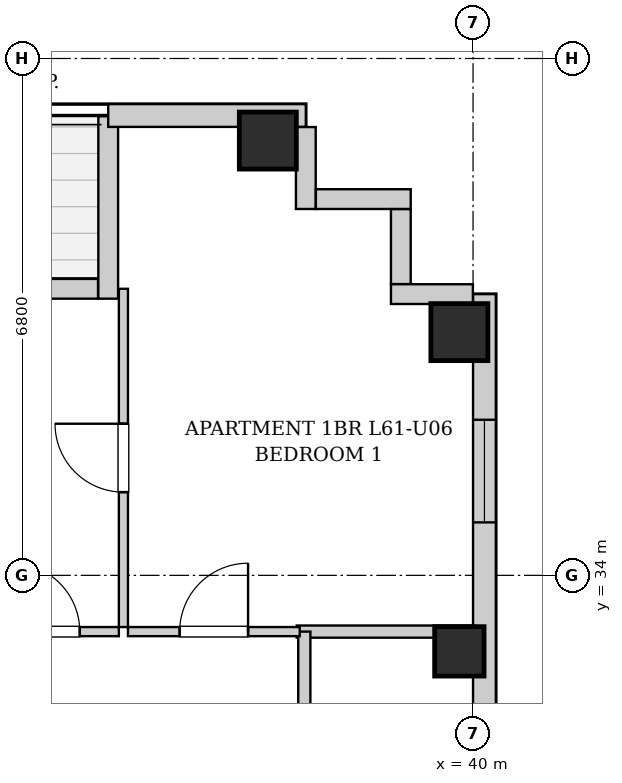
"""IFC4 building model, lengths in metres.
Left out: names, types, materials, properties, quantities, classifications, styles, units other than length and angle.
Written with IfcOpenShell. Run it as: python <this file> out.ifc"""

import sys

from ifc_helpers import new_model, si_unit, direction, frame, frame_2d, origin, origin_2d, place, context, subcontext, project, spatial, rectangle, extrude, element, fill, save


model = new_model("IFC4")
c1 = context("Model", 3, precision=1e-05, world=origin(), true_north=direction((0.0, 1.0)))
c2 = subcontext(c1, "Body", "Model", "MODEL_VIEW")
j1 = project(units=[si_unit("LENGTHUNIT", "METRE"), si_unit("PLANEANGLEUNIT", "RADIAN")], contexts=[c1])
p1 = place(None, origin())
s1 = spatial("IfcSite", under=j1, at=p1, CompositionType="ELEMENT")
p2 = place(p1, origin())
s2 = spatial("IfcBuilding", under=s1, at=p2, CompositionType="ELEMENT")
p3 = place(p2, frame((0.0, 0.0, 210.7)))
s3 = spatial("IfcBuildingStorey", under=s2, at=p3, CompositionType="ELEMENT", Elevation=210.7)
p4 = place(p3, frame((37.3, 39.72, 0.0), z_axis=(0.0, 0.0, 1.0), x_axis=(1.0, 0.0, 0.0)))
e1 = element("IfcColumn", 1, at=p4, inside=s3, PredefinedType="COLUMN", context=c2, shape_type="SweptSolid", body=[
    extrude(rectangle(XDim=0.75, YDim=0.75, at=origin_2d()), origin(), (0.0, 0.0, 1.0), 3.3),
])
p5 = place(p3, frame((39.82, 33.0, 0.0), z_axis=(0.0, 0.0, 1.0), x_axis=(1.0, 0.0, 0.0)))
e2 = element("IfcColumn", 2, at=p5, inside=s3, PredefinedType="COLUMN", context=c2, shape_type="SweptSolid", body=[
    extrude(rectangle(XDim=0.65, YDim=0.65, at=origin_2d()), origin(), (0.0, 0.0, 1.0), 3.3),
])
p6 = place(p3, frame((39.82, 37.2, 0.0), z_axis=(0.0, 0.0, 1.0), x_axis=(1.0, 0.0, 0.0)))
e3 = element("IfcColumn", 3, at=p6, inside=s3, PredefinedType="COLUMN", context=c2, shape_type="SweptSolid", body=[
    extrude(rectangle(XDim=0.75, YDim=0.75, at=origin_2d()), origin(), (0.0, 0.0, 1.0), 3.3),
])
p7 = place(p3, frame((30.184, 37.77, 0.0), z_axis=(0.0, 0.0, 1.0), x_axis=(1.0, 0.0, 0.0)))
e4 = element("IfcWall", 4, at=p7, inside=s3, PredefinedType="SOLIDWALL", context=c2, shape_type="SweptSolid", body=[
    extrude(rectangle(XDim=4.882, YDim=0.26, at=frame_2d((2.441, 0.0))), origin(), (0.0, 0.0, 1.0), 3.04),
])
p8 = place(p7, frame((1.891, 0.0, 0.0)))
e5 = element("IfcOpeningElement", 5, at=p8, cuts=e4, PredefinedType="OPENING", context=c2, shape_type="SweptSolid", body=[
    extrude(rectangle(XDim=1.1, YDim=2.0, at=frame_2d((0.55, 1.0))), frame((0.0, 0.14, 0.0), z_axis=(0.0, -1.0, 0.0), x_axis=(1.0, 0.0, 0.0)), (0.0, 0.0, 1.0), 0.28),
])
p9 = place(p7, frame((3.151, 0.0, 0.55)))
e6 = element("IfcOpeningElement", 6, at=p9, cuts=e4, PredefinedType="OPENING", context=c2, shape_type="SweptSolid", body=[
    extrude(rectangle(XDim=0.85, YDim=1.2, at=frame_2d((0.425, 0.6))), frame((0.0, 0.14, 0.0), z_axis=(0.0, -1.0, 0.0), x_axis=(1.0, 0.0, 0.0)), (0.0, 0.0, 1.0), 0.28),
])
p10 = place(p3, frame((35.2, 37.64, 0.0), z_axis=(0.0, 0.0, 1.0), x_axis=(0.0, 1.0, 0.0)))
e7 = element("IfcWall", 7, at=p10, inside=s3, PredefinedType="SOLIDWALL", context=c2, shape_type="SweptSolid", body=[
    extrude(rectangle(XDim=2.4, YDim=0.26, at=frame_2d((1.2, 0.0))), origin(), (0.0, 0.0, 1.0), 3.04),
])
p11 = place(p3, frame((35.2, 40.05, 0.0), z_axis=(0.0, 0.0, 1.0), x_axis=(1.0, 0.0, 0.0)))
e8 = element("IfcWall", 8, at=p11, inside=s3, PredefinedType="SOLIDWALL", context=c2, shape_type="SweptSolid", body=[
    extrude(rectangle(XDim=2.6, YDim=0.3, at=frame_2d((1.3, 0.0))), origin(), (0.0, 0.0, 1.0), 3.04),
])
p12 = place(p3, frame((40.15, 37.7, 0.0), z_axis=(0.0, 0.0, 1.0), x_axis=(0.0, -1.0, 0.0)))
e9 = element("IfcWall", 9, at=p12, inside=s3, PredefinedType="SOLIDWALL", context=c2, shape_type="SweptSolid", body=[
    extrude(rectangle(XDim=31.4, YDim=0.3, at=frame_2d((15.7, 0.0))), origin(), (0.0, 0.0, 1.0), 3.04),
])
p13 = place(p12, frame((28.396, 0.0, 0.55)))
e10 = element("IfcOpeningElement", 10, at=p13, cuts=e9, PredefinedType="OPENING", context=c2, shape_type="SweptSolid", body=[
    extrude(rectangle(XDim=1.35, YDim=1.2, at=frame_2d((0.675, 0.6))), frame((0.0, 0.16, 0.0), z_axis=(0.0, -1.0, 0.0), x_axis=(1.0, 0.0, 0.0)), (0.0, 0.0, 1.0), 0.32),
])
p14 = place(p12, frame((1.653, 0.0, 0.55)))
e11 = element("IfcOpeningElement", 11, at=p14, cuts=e9, PredefinedType="OPENING", context=c2, shape_type="SweptSolid", body=[
    extrude(rectangle(XDim=1.35, YDim=1.2, at=frame_2d((0.675, 0.6))), frame((0.0, 0.16, 0.0), z_axis=(0.0, -1.0, 0.0), x_axis=(1.0, 0.0, 0.0)), (0.0, 0.0, 1.0), 0.32),
])
p15 = place(p12, frame((18.856, 0.0, 0.55)))
e12 = element("IfcOpeningElement", 12, at=p15, cuts=e9, PredefinedType="OPENING", context=c2, shape_type="SweptSolid", body=[
    extrude(rectangle(XDim=1.35, YDim=1.2, at=frame_2d((0.675, 0.6))), frame((0.0, 0.16, 0.0), z_axis=(0.0, -1.0, 0.0), x_axis=(1.0, 0.0, 0.0)), (0.0, 0.0, 1.0), 0.32),
])
p16 = place(p12, frame((20.466, 0.0, 0.55)))
e13 = element("IfcOpeningElement", 13, at=p16, cuts=e9, PredefinedType="OPENING", context=c2, shape_type="SweptSolid", body=[
    extrude(rectangle(XDim=1.35, YDim=1.2, at=frame_2d((0.675, 0.6))), frame((0.0, 0.16, 0.0), z_axis=(0.0, -1.0, 0.0), x_axis=(1.0, 0.0, 0.0)), (0.0, 0.0, 1.0), 0.32),
])
p17 = place(p12, frame((11.85, 0.0, 0.55)))
e14 = element("IfcOpeningElement", 14, at=p17, cuts=e9, PredefinedType="OPENING", context=c2, shape_type="SweptSolid", body=[
    extrude(rectangle(XDim=1.35, YDim=1.2, at=frame_2d((0.675, 0.6))), frame((0.0, 0.16, 0.0), z_axis=(0.0, -1.0, 0.0), x_axis=(1.0, 0.0, 0.0)), (0.0, 0.0, 1.0), 0.32),
])
p18 = place(p12, frame((9.185, 0.0, 0.55)))
e15 = element("IfcOpeningElement", 15, at=p18, cuts=e9, PredefinedType="OPENING", context=c2, shape_type="SweptSolid", body=[
    extrude(rectangle(XDim=1.35, YDim=1.2, at=frame_2d((0.675, 0.6))), frame((0.0, 0.16, 0.0), z_axis=(0.0, -1.0, 0.0), x_axis=(1.0, 0.0, 0.0)), (0.0, 0.0, 1.0), 0.32),
])
p19 = place(p3, frame((37.8, 39.898, 0.0), z_axis=(0.0, 0.0, 1.0), x_axis=(0.0, -1.0, 0.0)))
e16 = element("IfcWall", 16, at=p19, inside=s3, PredefinedType="SOLIDWALL", context=c2, shape_type="SweptSolid", body=[
    extrude(rectangle(XDim=1.078, YDim=0.26, at=frame_2d((0.539, 0.0))), origin(), (0.0, 0.0, 1.0), 3.04),
])
p20 = place(p3, frame((37.932, 38.95, 0.0), z_axis=(0.0, 0.0, 1.0), x_axis=(1.0, 0.0, 0.0)))
e17 = element("IfcWall", 17, at=p20, inside=s3, PredefinedType="SOLIDWALL", context=c2, shape_type="SweptSolid", body=[
    extrude(rectangle(XDim=1.248, YDim=0.26, at=frame_2d((0.624, 0.0))), origin(), (0.0, 0.0, 1.0), 3.04),
])
p21 = place(p3, frame((39.05, 38.818, 0.0), z_axis=(0.0, 0.0, 1.0), x_axis=(0.0, -1.0, 0.0)))
e18 = element("IfcWall", 18, at=p21, inside=s3, PredefinedType="SOLIDWALL", context=c2, shape_type="SweptSolid", body=[
    extrude(rectangle(XDim=0.986, YDim=0.26, at=frame_2d((0.493, 0.0))), origin(), (0.0, 0.0, 1.0), 3.04),
])
p22 = place(p3, frame((38.92, 37.7, 0.0), z_axis=(0.0, 0.0, 1.0), x_axis=(1.0, 0.0, 0.0)))
e19 = element("IfcWall", 19, at=p22, inside=s3, PredefinedType="SOLIDWALL", context=c2, shape_type="SweptSolid", body=[
    extrude(rectangle(XDim=1.078, YDim=0.26, at=frame_2d((0.539, 0.0))), origin(), (0.0, 0.0, 1.0), 3.04),
])
p23 = place(p3, frame((37.68, 33.26, 0.0), z_axis=(0.0, 0.0, 1.0), x_axis=(1.0, 0.0, 0.0)))
e20 = element("IfcWall", 20, at=p23, inside=s3, PredefinedType="PARTITIONING", context=c2, shape_type="SweptSolid", body=[
    extrude(rectangle(XDim=2.34, YDim=0.16, at=frame_2d((1.17, 0.0))), origin(), (0.0, 0.0, 1.0), 3.04),
])
p24 = place(p3, frame((37.78, 30.6, 0.0), z_axis=(0.0, 0.0, 1.0), x_axis=(0.0, 1.0, 0.0)))
e21 = element("IfcWall", 21, at=p24, inside=s3, PredefinedType="PARTITIONING", context=c2, shape_type="SweptSolid", body=[
    extrude(rectangle(XDim=2.66, YDim=0.16, at=frame_2d((1.33, 0.0))), origin(), (0.0, 0.0, 1.0), 3.04),
])
p25 = place(p3, frame((33.412, 33.26, 0.0), z_axis=(0.0, 0.0, 1.0), x_axis=(1.0, 0.0, 0.0)))
e22 = element("IfcWall", 22, at=p25, inside=s3, PredefinedType="PARTITIONING", context=c2, shape_type="SweptSolid", body=[
    extrude(rectangle(XDim=1.928, YDim=0.12, at=frame_2d((0.964, 0.0))), origin(), (0.0, 0.0, 1.0), 3.04),
])
p26 = place(p25, frame((0.514, 0.0, 0.0)))
e23 = element("IfcOpeningElement", 23, at=p26, cuts=e22, PredefinedType="OPENING", context=c2, shape_type="SweptSolid", body=[
    extrude(rectangle(XDim=0.9, YDim=2.05, at=frame_2d((0.45, 1.025))), frame((0.0, 0.07, 0.0), z_axis=(0.0, -1.0, 0.0), x_axis=(1.0, 0.0, 0.0)), (0.0, 0.0, 1.0), 0.14),
])
p27 = place(p3, frame((35.46, 33.26, 0.0), z_axis=(0.0, 0.0, 1.0), x_axis=(1.0, 0.0, 0.0)))
e24 = element("IfcWall", 24, at=p27, inside=s3, PredefinedType="PARTITIONING", context=c2, shape_type="SweptSolid", body=[
    extrude(rectangle(XDim=2.26, YDim=0.12, at=frame_2d((1.13, 0.0))), origin(), (0.0, 0.0, 1.0), 3.04),
])
p28 = place(p27, frame((0.68, 0.0, 0.0)))
e25 = element("IfcOpeningElement", 25, at=p28, cuts=e24, PredefinedType="OPENING", context=c2, shape_type="SweptSolid", body=[
    extrude(rectangle(XDim=0.9, YDim=2.05, at=frame_2d((0.45, 1.025))), frame((0.0, 0.07, 0.0), z_axis=(0.0, -1.0, 0.0), x_axis=(1.0, 0.0, 0.0)), (0.0, 0.0, 1.0), 0.14),
])
p29 = place(p3, frame((35.4, 33.32, 0.0), z_axis=(0.0, 0.0, 1.0), x_axis=(0.0, 1.0, 0.0)))
e26 = element("IfcWall", 26, at=p29, inside=s3, PredefinedType="PARTITIONING", context=c2, shape_type="SweptSolid", body=[
    extrude(rectangle(XDim=4.45, YDim=0.12, at=frame_2d((2.225, 0.0))), origin(), (0.0, 0.0, 1.0), 3.04),
])
p30 = place(p29, frame((1.775, 0.0, 0.0)))
e27 = element("IfcOpeningElement", 27, at=p30, cuts=e26, PredefinedType="OPENING", context=c2, shape_type="SweptSolid", body=[
    extrude(rectangle(XDim=0.9, YDim=2.05, at=frame_2d((0.45, 1.025))), frame((0.0, 0.07, 0.0), z_axis=(0.0, -1.0, 0.0), x_axis=(1.0, 0.0, 0.0)), (0.0, 0.0, 1.0), 0.14),
])
p31 = place(p26, origin())
e28 = element("IfcDoor", 28, at=p31, inside=s3, OperationType="SINGLE_SWING_LEFT", PredefinedType="DOOR", context=c2, shape_type="SweptSolid", body=[
    extrude(rectangle(XDim=0.9, YDim=2.05, at=frame_2d((0.45, 1.025))), frame((0.0, 0.025, 0.0), z_axis=(0.0, -1.0, 0.0), x_axis=(1.0, 0.0, 0.0)), (0.0, 0.0, 1.0), 0.05),
])
fill(e23, e28)
p32 = place(p28, origin())
e29 = element("IfcDoor", 29, at=p32, inside=s3, OperationType="SINGLE_SWING_RIGHT", PredefinedType="DOOR", context=c2, shape_type="SweptSolid", body=[
    extrude(rectangle(XDim=0.9, YDim=2.05, at=frame_2d((0.45, 1.025))), frame((0.0, 0.025, 0.0), z_axis=(0.0, -1.0, 0.0), x_axis=(1.0, 0.0, 0.0)), (0.0, 0.0, 1.0), 0.05),
])
fill(e25, e29)
p33 = place(p30, origin())
e30 = element("IfcDoor", 30, at=p33, inside=s3, OperationType="SINGLE_SWING_RIGHT", PredefinedType="DOOR", context=c2, shape_type="SweptSolid", body=[
    extrude(rectangle(XDim=0.9, YDim=2.05, at=frame_2d((0.45, 1.025))), frame((0.0, 0.025, 0.0), z_axis=(0.0, -1.0, 0.0), x_axis=(1.0, 0.0, 0.0)), (0.0, 0.0, 1.0), 0.05),
])
fill(e27, e30)
p34 = place(p14, origin())
e31 = element("IfcWindow", 31, at=p34, inside=s3, PartitioningType="SINGLE_PANEL", PredefinedType="WINDOW", context=c2, shape_type="SweptSolid", body=[
    extrude(rectangle(XDim=1.35, YDim=1.2, at=frame_2d((0.675, 0.6))), frame((0.0, 0.03, 0.0), z_axis=(0.0, -1.0, 0.0), x_axis=(1.0, 0.0, 0.0)), (0.0, 0.0, 1.0), 0.06),
])
fill(e11, e31)
save(model, sys.argv[1])
